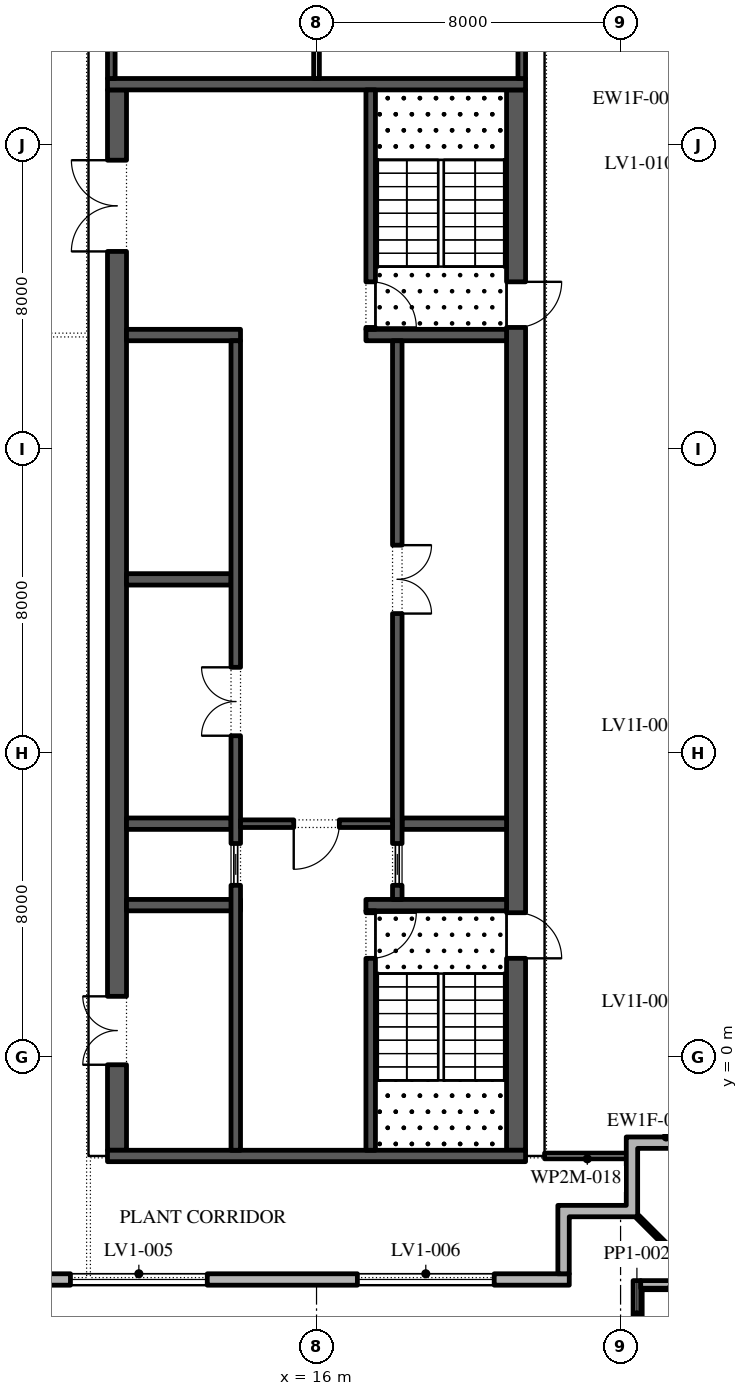
"""IFC4 building model, lengths in metres.
Left out: names, types, materials, properties, quantities, classifications, styles, units other than length and angle.
Written with IfcOpenShell. Run it as: python <this file> out.ifc"""

import sys

from ifc_helpers import new_model, si_unit, direction, frame, frame_2d, origin, place, context, subcontext, project, spatial, polyline, rectangle, outline, extrude, element, fill, save


model = new_model("IFC4")
c1 = context("Model", 3, precision=1e-05, world=origin(), true_north=direction((0.0, 1.0)))
c2 = subcontext(c1, "Body", "Model", "MODEL_VIEW")
j1 = project(units=[si_unit("LENGTHUNIT", "METRE"), si_unit("PLANEANGLEUNIT", "RADIAN")], contexts=[c1])
p1 = place(None, origin())
s1 = spatial("IfcSite", under=j1, at=p1, CompositionType="ELEMENT")
p2 = place(p1, origin())
s2 = spatial("IfcBuilding", under=s1, at=p2, CompositionType="ELEMENT")
p3 = place(p2, frame((0.0, 0.0, 363.6)))
s3 = spatial("IfcBuildingStorey", under=s2, at=p3, CompositionType="ELEMENT", Elevation=363.6)
p4 = place(p3, frame((-22.35, -5.85, 0.0), z_axis=(0.0, 0.0, 1.0), x_axis=(1.0, 0.0, 0.0)))
e1 = element("IfcWall", 1, at=p4, inside=s3, PredefinedType="STANDARD", context=c2, shape_type="SweptSolid", body=[
    extrude(rectangle(XDim=45.0, YDim=0.3, at=frame_2d((22.5, 0.0))), origin(), (0.0, 0.0, 1.0), 5.2),
])
p5 = place(p4, frame((1.825, 0.0, 0.6)))
e2 = element("IfcOpeningElement", 2, at=p5, cuts=e1, PredefinedType="OPENING", context=c2, shape_type="SweptSolid", body=[
    extrude(rectangle(XDim=3.6, YDim=4.15, at=frame_2d((1.8, 2.075))), frame((0.0, 0.16, 0.0), z_axis=(0.0, -1.0, 0.0), x_axis=(1.0, 0.0, 0.0)), (0.0, 0.0, 1.0), 0.32),
])
p6 = place(p4, frame((9.225, 0.0, 0.6)))
e3 = element("IfcOpeningElement", 3, at=p6, cuts=e1, PredefinedType="OPENING", context=c2, shape_type="SweptSolid", body=[
    extrude(rectangle(XDim=3.6, YDim=4.15, at=frame_2d((1.8, 2.075))), frame((0.0, 0.16, 0.0), z_axis=(0.0, -1.0, 0.0), x_axis=(1.0, 0.0, 0.0)), (0.0, 0.0, 1.0), 0.32),
])
p7 = place(p4, frame((16.775, 0.0, 0.6)))
e4 = element("IfcOpeningElement", 4, at=p7, cuts=e1, PredefinedType="OPENING", context=c2, shape_type="SweptSolid", body=[
    extrude(rectangle(XDim=3.6, YDim=4.15, at=frame_2d((1.8, 2.075))), frame((0.0, 0.16, 0.0), z_axis=(0.0, -1.0, 0.0), x_axis=(1.0, 0.0, 0.0)), (0.0, 0.0, 1.0), 0.32),
])
p8 = place(p4, frame((24.325, 0.0, 0.6)))
e5 = element("IfcOpeningElement", 5, at=p8, cuts=e1, PredefinedType="OPENING", context=c2, shape_type="SweptSolid", body=[
    extrude(rectangle(XDim=3.6, YDim=4.15, at=frame_2d((1.8, 2.075))), frame((0.0, 0.16, 0.0), z_axis=(0.0, -1.0, 0.0), x_axis=(1.0, 0.0, 0.0)), (0.0, 0.0, 1.0), 0.32),
])
p9 = place(p4, frame((31.875, 0.0, 0.6)))
e6 = element("IfcOpeningElement", 6, at=p9, cuts=e1, PredefinedType="OPENING", context=c2, shape_type="SweptSolid", body=[
    extrude(rectangle(XDim=3.6, YDim=4.15, at=frame_2d((1.8, 2.075))), frame((0.0, 0.16, 0.0), z_axis=(0.0, -1.0, 0.0), x_axis=(1.0, 0.0, 0.0)), (0.0, 0.0, 1.0), 0.32),
])
p10 = place(p4, frame((39.425, 0.0, 0.6)))
e7 = element("IfcOpeningElement", 7, at=p10, cuts=e1, PredefinedType="OPENING", context=c2, shape_type="SweptSolid", body=[
    extrude(rectangle(XDim=3.6, YDim=4.15, at=frame_2d((1.8, 2.075))), frame((0.0, 0.16, 0.0), z_axis=(0.0, -1.0, 0.0), x_axis=(1.0, 0.0, 0.0)), (0.0, 0.0, 1.0), 0.32),
])
p11 = place(p3, origin())
e8 = element("IfcWall", 8, at=p11, inside=s3, PredefinedType="STANDARD", context=c2, shape_type="SweptSolid", body=[
    extrude(outline(polyline([(24.15, -3.9), (24.15, -2.1), (26.25, -2.1), (26.25, -2.4), (24.45, -2.4), (24.45, -4.2), (22.65, -4.2), (22.65, -5.7), (22.35, -5.7), (22.35, -3.9), (24.15, -3.9)])), origin(), (0.0, 0.0, 1.0), 5.2),
])
p12 = place(p3, frame((24.43, -7.68, -0.05), z_axis=(0.0, 0.0, 1.0), x_axis=(0.0, 1.0, 0.0)))
e9 = element("IfcWall", 9, at=p12, inside=s3, PredefinedType="STANDARD", context=c2, shape_type="SweptSolid", body=[
    extrude(rectangle(XDim=1.8, YDim=0.2, at=frame_2d((0.9, 0.0))), origin(), (0.0, 0.0, 1.0), 1.1),
])
p13 = place(p3, frame((24.53, -5.98, -0.05), z_axis=(0.0, 0.0, 1.0), x_axis=(1.0, 0.0, 0.0)))
e10 = element("IfcWall", 10, at=p13, inside=s3, PredefinedType="STANDARD", context=c2, shape_type="SweptSolid", body=[
    extrude(rectangle(XDim=1.608, YDim=0.2, at=frame_2d((0.804, 0.0))), origin(), (0.0, 0.0, 1.0), 1.1),
])
p14 = place(p3, frame((24.45, -4.2, -0.05), z_axis=(0.0, 0.0, 1.0), x_axis=(0.707106781187, -0.707106781187, 0.0)))
e11 = element("IfcWall", 11, at=p14, inside=s3, PredefinedType="STANDARD", context=c2, shape_type="SweptSolid", body=[
    extrude(rectangle(XDim=2.667, YDim=0.1, at=frame_2d((1.333, 0.0))), origin(), (0.0, 0.0, 1.0), 5.25),
])
p15 = place(p3, frame((21.25, -2.45, 0.0), z_axis=(0.0, 0.0, 1.0), x_axis=(0.0, 1.0, 0.0)))
e12 = element("IfcWall", 12, at=p15, inside=s3, PredefinedType="SHEAR", context=c2, shape_type="SweptSolid", body=[
    extrude(rectangle(XDim=27.9, YDim=0.5, at=frame_2d((13.95, 0.0))), origin(), (0.0, 0.0, 1.0), 5.2),
])
p16 = place(p15, frame((5.05, 0.0, 0.0)))
e13 = element("IfcOpeningElement", 13, at=p16, cuts=e12, PredefinedType="OPENING", context=c2, shape_type="SweptSolid", body=[
    extrude(rectangle(XDim=1.2, YDim=2.1, at=frame_2d((0.6, 1.05))), frame((0.0, 0.26, 0.0), z_axis=(0.0, -1.0, 0.0), x_axis=(1.0, 0.0, 0.0)), (0.0, 0.0, 1.0), 0.52),
])
p17 = place(p15, frame((21.65, 0.0, 0.0)))
e14 = element("IfcOpeningElement", 14, at=p17, cuts=e12, PredefinedType="OPENING", context=c2, shape_type="SweptSolid", body=[
    extrude(rectangle(XDim=1.2, YDim=2.1, at=frame_2d((0.6, 1.05))), frame((0.0, 0.26, 0.0), z_axis=(0.0, -1.0, 0.0), x_axis=(1.0, 0.0, 0.0)), (0.0, 0.0, 1.0), 0.52),
])
p18 = place(p3, frame((10.75, -2.45, 0.0), z_axis=(0.0, 0.0, 1.0), x_axis=(0.0, 1.0, 0.0)))
e15 = element("IfcWall", 15, at=p18, inside=s3, PredefinedType="SHEAR", context=c2, shape_type="SweptSolid", body=[
    extrude(rectangle(XDim=27.9, YDim=0.5, at=frame_2d((13.95, 0.0))), origin(), (0.0, 0.0, 1.0), 5.2),
])
p19 = place(p18, frame((23.65, 0.0, 0.0)))
e16 = element("IfcOpeningElement", 16, at=p19, cuts=e15, PredefinedType="OPENING", context=c2, shape_type="SweptSolid", body=[
    extrude(rectangle(XDim=2.4, YDim=2.1, at=frame_2d((1.2, 1.05))), frame((0.0, 0.26, 0.0), z_axis=(0.0, -1.0, 0.0), x_axis=(1.0, 0.0, 0.0)), (0.0, 0.0, 1.0), 0.52),
])
p20 = place(p18, frame((2.25, 0.0, 0.0)))
e17 = element("IfcOpeningElement", 17, at=p20, cuts=e15, PredefinedType="OPENING", context=c2, shape_type="SweptSolid", body=[
    extrude(rectangle(XDim=1.8, YDim=2.4, at=frame_2d((0.9, 1.2))), frame((0.0, 0.26, 0.0), z_axis=(0.0, -1.0, 0.0), x_axis=(1.0, 0.0, 0.0)), (0.0, 0.0, 1.0), 0.52),
])
for number, where, z_axis, x_axis in (
    (18, (10.5, -2.6, 0.0), (0.0, 0.0, 1.0), (1.0, 0.0, 0.0)),
    (19, (10.5, 25.6, 0.0), (0.0, 0.0, 1.0), (1.0, 0.0, 0.0)),
):
    element("IfcWall", number, at=place(p3, frame(where, z_axis=z_axis, x_axis=x_axis)), inside=s3, PredefinedType="SHEAR", context=c2, shape_type="SweptSolid", body=[
        extrude(rectangle(XDim=11.0, YDim=0.3, at=frame_2d((5.5, 0.0))), origin(), (0.0, 0.0, 1.0), 5.2),
    ])
p21 = place(p3, frame((17.3, 4.0, 0.0), z_axis=(0.0, 0.0, 1.0), x_axis=(1.0, 0.0, 0.0)))
e20 = element("IfcWall", 20, at=p21, inside=s3, PredefinedType="SHEAR", context=c2, shape_type="SweptSolid", body=[
    extrude(rectangle(XDim=3.7, YDim=0.3, at=frame_2d((1.85, 0.0))), origin(), (0.0, 0.0, 1.0), 5.2),
])
p22 = place(p3, frame((17.425, -2.45, 0.0), z_axis=(0.0, 0.0, 1.0), x_axis=(0.0, 1.0, 0.0)))
e21 = element("IfcWall", 21, at=p22, inside=s3, PredefinedType="SHEAR", context=c2, shape_type="SweptSolid", body=[
    extrude(rectangle(XDim=6.3, YDim=0.25, at=frame_2d((3.15, 0.0))), origin(), (0.0, 0.0, 1.0), 5.2),
])
p23 = place(p22, frame((5.05, 0.0, 0.0)))
e22 = element("IfcOpeningElement", 22, at=p23, cuts=e21, PredefinedType="OPENING", context=c2, shape_type="SweptSolid", body=[
    extrude(rectangle(XDim=1.2, YDim=2.1, at=frame_2d((0.6, 1.05))), frame((0.0, 0.135, 0.0), z_axis=(0.0, -1.0, 0.0), x_axis=(1.0, 0.0, 0.0)), (0.0, 0.0, 1.0), 0.27),
])
p24 = place(p3, frame((17.3, 19.0, 0.0), z_axis=(0.0, 0.0, 1.0), x_axis=(1.0, 0.0, 0.0)))
e23 = element("IfcWall", 23, at=p24, inside=s3, PredefinedType="SHEAR", context=c2, shape_type="SweptSolid", body=[
    extrude(rectangle(XDim=3.7, YDim=0.3, at=frame_2d((1.85, 0.0))), origin(), (0.0, 0.0, 1.0), 5.2),
])
p25 = place(p3, frame((17.425, 19.15, 0.0), z_axis=(0.0, 0.0, 1.0), x_axis=(0.0, 1.0, 0.0)))
e24 = element("IfcWall", 24, at=p25, inside=s3, PredefinedType="SHEAR", context=c2, shape_type="SweptSolid", body=[
    extrude(rectangle(XDim=6.3, YDim=0.25, at=frame_2d((3.15, 0.0))), origin(), (0.0, 0.0, 1.0), 5.2),
])
p26 = place(p25, frame((0.05, 0.0, 0.0)))
e25 = element("IfcOpeningElement", 25, at=p26, cuts=e24, PredefinedType="OPENING", context=c2, shape_type="SweptSolid", body=[
    extrude(rectangle(XDim=1.2, YDim=2.1, at=frame_2d((0.6, 1.05))), frame((0.0, 0.135, 0.0), z_axis=(0.0, -1.0, 0.0), x_axis=(1.0, 0.0, 0.0)), (0.0, 0.0, 1.0), 0.27),
])
p27 = place(p3, frame((18.25, 6.143, 0.0), z_axis=(0.0, 0.0, 1.0), x_axis=(1.0, 0.0, 0.0)))
e26 = element("IfcWall", 26, at=p27, inside=s3, PredefinedType="SHEAR", context=c2, shape_type="SweptSolid", body=[
    extrude(rectangle(XDim=2.75, YDim=0.3, at=frame_2d((1.375, 0.0))), origin(), (0.0, 0.0, 1.0), 5.2),
])
p28 = place(p3, frame((18.125, 4.15, 0.0), z_axis=(0.0, 0.0, 1.0), x_axis=(0.0, 1.0, 0.0)))
e27 = element("IfcWall", 27, at=p28, inside=s3, PredefinedType="SHEAR", context=c2, shape_type="SweptSolid", body=[
    extrude(rectangle(XDim=14.7, YDim=0.25, at=frame_2d((7.35, 0.0))), origin(), (0.0, 0.0, 1.0), 5.2),
])
p29 = place(p28, frame((7.521, 0.0, 0.0)))
e28 = element("IfcOpeningElement", 28, at=p29, cuts=e27, PredefinedType="OPENING", context=c2, shape_type="SweptSolid", body=[
    extrude(rectangle(XDim=1.8, YDim=2.4, at=frame_2d((0.9, 1.2))), frame((0.0, 0.135, 0.0), z_axis=(0.0, -1.0, 0.0), x_axis=(1.0, 0.0, 0.0)), (0.0, 0.0, 1.0), 0.27),
])
p30 = place(p28, frame((0.371, 0.0, 0.0)))
e29 = element("IfcOpeningElement", 29, at=p30, cuts=e27, PredefinedType="OPENING", context=c2, shape_type="SweptSolid", body=[
    extrude(rectangle(XDim=1.1, YDim=2.1, at=frame_2d((0.55, 1.05))), frame((0.0, 0.135, 0.0), z_axis=(0.0, -1.0, 0.0), x_axis=(1.0, 0.0, 0.0)), (0.0, 0.0, 1.0), 0.27),
])
p31 = place(p3, frame((11.0, 4.0, 0.0), z_axis=(0.0, 0.0, 1.0), x_axis=(1.0, 0.0, 0.0)))
e30 = element("IfcWall", 30, at=p31, inside=s3, PredefinedType="SHEAR", context=c2, shape_type="SweptSolid", body=[
    extrude(rectangle(XDim=3.0, YDim=0.3, at=frame_2d((1.5, 0.0))), origin(), (0.0, 0.0, 1.0), 5.2),
])
for number, where, z_axis, x_axis in (
    (31, (11.0, 6.143, 0.0), (0.0, 0.0, 1.0), (1.0, 0.0, 0.0)),
    (32, (11.0, 12.571, 0.0), (0.0, 0.0, 1.0), (1.0, 0.0, 0.0)),
):
    element("IfcWall", number, at=place(p3, frame(where, z_axis=z_axis, x_axis=x_axis)), inside=s3, PredefinedType="SHEAR", context=c2, shape_type="SweptSolid", body=[
        extrude(rectangle(XDim=2.75, YDim=0.3, at=frame_2d((1.375, 0.0))), origin(), (0.0, 0.0, 1.0), 5.2),
    ])
p32 = place(p3, frame((11.0, 19.0, 0.0), z_axis=(0.0, 0.0, 1.0), x_axis=(1.0, 0.0, 0.0)))
e33 = element("IfcWall", 33, at=p32, inside=s3, PredefinedType="SHEAR", context=c2, shape_type="SweptSolid", body=[
    extrude(rectangle(XDim=3.0, YDim=0.3, at=frame_2d((1.5, 0.0))), origin(), (0.0, 0.0, 1.0), 5.2),
])
p33 = place(p3, frame((13.875, -2.45, 0.0), z_axis=(0.0, 0.0, 1.0), x_axis=(0.0, 1.0, 0.0)))
e34 = element("IfcWall", 34, at=p33, inside=s3, PredefinedType="SHEAR", context=c2, shape_type="SweptSolid", body=[
    extrude(rectangle(XDim=21.3, YDim=0.25, at=frame_2d((10.65, 0.0))), origin(), (0.0, 0.0, 1.0), 5.2),
])
p34 = place(p33, frame((10.907, 0.0, 0.0)))
e35 = element("IfcOpeningElement", 35, at=p34, cuts=e34, PredefinedType="OPENING", context=c2, shape_type="SweptSolid", body=[
    extrude(rectangle(XDim=1.8, YDim=2.4, at=frame_2d((0.9, 1.2))), frame((0.0, 0.135, 0.0), z_axis=(0.0, -1.0, 0.0), x_axis=(1.0, 0.0, 0.0)), (0.0, 0.0, 1.0), 0.27),
])
p35 = place(p33, frame((6.971, 0.0, 0.0)))
e36 = element("IfcOpeningElement", 36, at=p35, cuts=e34, PredefinedType="OPENING", context=c2, shape_type="SweptSolid", body=[
    extrude(rectangle(XDim=1.1, YDim=2.1, at=frame_2d((0.55, 1.05))), frame((0.0, 0.135, 0.0), z_axis=(0.0, -1.0, 0.0), x_axis=(1.0, 0.0, 0.0)), (0.0, 0.0, 1.0), 0.27),
])
p36 = place(p3, frame((14.0, 6.143, 0.0), z_axis=(0.0, 0.0, 1.0), x_axis=(1.0, 0.0, 0.0)))
e37 = element("IfcWall", 37, at=p36, inside=s3, PredefinedType="SHEAR", context=c2, shape_type="SweptSolid", body=[
    extrude(rectangle(XDim=4.0, YDim=0.2, at=frame_2d((2.0, 0.0))), origin(), (0.0, 0.0, 1.0), 5.2),
])
p37 = place(p36, frame((1.4, 0.0, 0.0)))
e38 = element("IfcOpeningElement", 38, at=p37, cuts=e37, PredefinedType="OPENING", context=c2, shape_type="SweptSolid", body=[
    extrude(rectangle(XDim=1.2, YDim=2.1, at=frame_2d((0.6, 1.05))), frame((0.0, 0.11, 0.0), z_axis=(0.0, -1.0, 0.0), x_axis=(1.0, 0.0, 0.0)), (0.0, 0.0, 1.0), 0.22),
])
p38 = place(p3, frame((21.4, 25.75, 0.0), z_axis=(0.0, 0.0, 1.0), x_axis=(0.0, 1.0, 0.0)))
e39 = element("IfcWall", 39, at=p38, inside=s3, PredefinedType="SHEAR", context=c2, shape_type="SweptSolid", body=[
    extrude(rectangle(XDim=15.05, YDim=0.2, at=frame_2d((7.525, 0.0))), origin(), (0.0, 0.0, 1.0), 5.2),
])
p39 = place(p38, frame((6.625, 0.0, 0.0)))
e40 = element("IfcOpeningElement", 40, at=p39, cuts=e39, PredefinedType="OPENING", context=c2, shape_type="SweptSolid", body=[
    extrude(rectangle(XDim=1.8, YDim=2.4, at=frame_2d((0.9, 1.2))), frame((0.0, 0.11, 0.0), z_axis=(0.0, -1.0, 0.0), x_axis=(1.0, 0.0, 0.0)), (0.0, 0.0, 1.0), 0.22),
])
p40 = place(p3, frame((10.6, 25.75, 0.0), z_axis=(0.0, 0.0, 1.0), x_axis=(0.0, 1.0, 0.0)))
e41 = element("IfcWall", 41, at=p40, inside=s3, PredefinedType="SHEAR", context=c2, shape_type="SweptSolid", body=[
    extrude(rectangle(XDim=15.05, YDim=0.2, at=frame_2d((7.525, 0.0))), origin(), (0.0, 0.0, 1.0), 5.2),
])
p41 = place(p40, frame((2.837, 0.0, 0.0)))
e42 = element("IfcOpeningElement", 42, at=p41, cuts=e41, PredefinedType="OPENING", context=c2, shape_type="SweptSolid", body=[
    extrude(rectangle(XDim=1.8, YDim=2.4, at=frame_2d((0.9, 1.2))), frame((0.0, 0.11, 0.0), z_axis=(0.0, -1.0, 0.0), x_axis=(1.0, 0.0, 0.0)), (0.0, 0.0, 1.0), 0.22),
])
p42 = place(p40, frame((10.438, 0.0, 0.0)))
e43 = element("IfcOpeningElement", 43, at=p42, cuts=e41, PredefinedType="OPENING", context=c2, shape_type="SweptSolid", body=[
    extrude(rectangle(XDim=1.8, YDim=2.4, at=frame_2d((0.9, 1.2))), frame((0.0, 0.11, 0.0), z_axis=(0.0, -1.0, 0.0), x_axis=(1.0, 0.0, 0.0)), (0.0, 0.0, 1.0), 0.22),
])
p43 = place(p3, frame((16.0, 25.75, 0.0), z_axis=(0.0, 0.0, 1.0), x_axis=(0.0, 1.0, 0.0)))
e44 = element("IfcWall", 44, at=p43, inside=s3, PredefinedType="PARTITIONING", context=c2, shape_type="SweptSolid", body=[
    extrude(rectangle(XDim=15.05, YDim=0.15, at=frame_2d((7.525, 0.0))), origin(), (0.0, 0.0, 1.0), 5.2),
])
p44 = place(p3, frame((22.0, -2.6, 0.0), z_axis=(0.0, 0.0, 1.0), x_axis=(1.0, 0.0, 0.0)))
e45 = element("IfcWall", 45, at=p44, inside=s3, PredefinedType="PARTITIONING", context=c2, shape_type="SweptSolid", body=[
    extrude(rectangle(XDim=2.25, YDim=0.15, at=frame_2d((1.125, 0.0))), origin(), (0.0, 0.0, 1.0), 5.2),
])
p45 = place(p9, origin())
e46 = element("IfcWindow", 46, at=p45, inside=s3, PartitioningType="DOUBLE_PANEL_HORIZONTAL", PredefinedType="WINDOW", context=c2, shape_type="SweptSolid", body=[
    extrude(rectangle(XDim=3.6, YDim=4.15, at=frame_2d((1.8, 2.075))), frame((0.0, 0.03, 0.0), z_axis=(0.0, -1.0, 0.0), x_axis=(1.0, 0.0, 0.0)), (0.0, 0.0, 1.0), 0.06),
])
fill(e6, e46)
p46 = place(p10, origin())
e47 = element("IfcWindow", 47, at=p46, inside=s3, PartitioningType="DOUBLE_PANEL_HORIZONTAL", PredefinedType="WINDOW", context=c2, shape_type="SweptSolid", body=[
    extrude(rectangle(XDim=3.6, YDim=4.15, at=frame_2d((1.8, 2.075))), frame((0.0, 0.03, 0.0), z_axis=(0.0, -1.0, 0.0), x_axis=(1.0, 0.0, 0.0)), (0.0, 0.0, 1.0), 0.06),
])
fill(e7, e47)
p47 = place(p29, frame((1.8, -0.2, 0.0), z_axis=(0.0, 0.0, 1.0), x_axis=(-1.0, 0.0, 0.0)))
e48 = element("IfcDoor", 48, at=p47, inside=s3, OperationType="DOUBLE_DOOR_SINGLE_SWING", PredefinedType="DOOR", context=c2, shape_type="SweptSolid", body=[
    extrude(rectangle(XDim=1.8, YDim=2.4, at=frame_2d((0.9, 1.2))), frame((0.0, -0.075, 0.0), z_axis=(0.0, -1.0, 0.0), x_axis=(1.0, 0.0, 0.0)), (0.0, 0.0, 1.0), 0.05),
])
fill(e28, e48)
p48 = place(p30, origin())
e49 = element("IfcDoor", 49, at=p48, inside=s3, OperationType="SLIDING_TO_LEFT", PredefinedType="DOOR", context=c2, shape_type="SweptSolid", body=[
    extrude(rectangle(XDim=1.1, YDim=2.1, at=frame_2d((0.55, 1.05))), frame((0.0, 0.025, 0.0), z_axis=(0.0, -1.0, 0.0), x_axis=(1.0, 0.0, 0.0)), (0.0, 0.0, 1.0), 0.05),
])
fill(e29, e49)
p49 = place(p34, origin())
e50 = element("IfcDoor", 50, at=p49, inside=s3, OperationType="DOUBLE_DOOR_SINGLE_SWING", PredefinedType="DOOR", context=c2, shape_type="SweptSolid", body=[
    extrude(rectangle(XDim=1.8, YDim=2.4, at=frame_2d((0.9, 1.2))), frame((0.0, 0.125, 0.0), z_axis=(0.0, -1.0, 0.0), x_axis=(1.0, 0.0, 0.0)), (0.0, 0.0, 1.0), 0.05),
])
fill(e35, e50)
p50 = place(p35, origin())
e51 = element("IfcDoor", 51, at=p50, inside=s3, OperationType="SLIDING_TO_LEFT", PredefinedType="DOOR", context=c2, shape_type="SweptSolid", body=[
    extrude(rectangle(XDim=1.1, YDim=2.1, at=frame_2d((0.55, 1.05))), frame((0.0, 0.025, 0.0), z_axis=(0.0, -1.0, 0.0), x_axis=(1.0, 0.0, 0.0)), (0.0, 0.0, 1.0), 0.05),
])
fill(e36, e51)
p51 = place(p37, frame((1.2, 0.0, 0.0), z_axis=(0.0, 0.0, 1.0), x_axis=(-1.0, 0.0, 0.0)))
e52 = element("IfcDoor", 52, at=p51, inside=s3, OperationType="SINGLE_SWING_LEFT", PredefinedType="DOOR", context=c2, shape_type="SweptSolid", body=[
    extrude(rectangle(XDim=1.2, YDim=2.1, at=frame_2d((0.6, 1.05))), frame((0.0, 0.025, 0.0), z_axis=(0.0, -1.0, 0.0), x_axis=(1.0, 0.0, 0.0)), (0.0, 0.0, 1.0), 0.05),
])
fill(e38, e52)
p52 = place(p19, origin())
e53 = element("IfcDoor", 53, at=p52, inside=s3, OperationType="DOUBLE_DOOR_SINGLE_SWING", PredefinedType="DOOR", context=c2, shape_type="SweptSolid", body=[
    extrude(rectangle(XDim=2.4, YDim=2.1, at=frame_2d((1.2, 1.05))), frame((0.0, 0.025, 0.0), z_axis=(0.0, -1.0, 0.0), x_axis=(1.0, 0.0, 0.0)), (0.0, 0.0, 1.0), 0.05),
])
fill(e16, e53)
p53 = place(p23, frame((1.2, 0.0, 0.0), z_axis=(0.0, 0.0, 1.0), x_axis=(-1.0, 0.0, 0.0)))
e54 = element("IfcDoor", 54, at=p53, inside=s3, OperationType="SINGLE_SWING_RIGHT", PredefinedType="DOOR", context=c2, shape_type="SweptSolid", body=[
    extrude(rectangle(XDim=1.2, YDim=2.1, at=frame_2d((0.6, 1.05))), frame((0.0, 0.025, 0.0), z_axis=(0.0, -1.0, 0.0), x_axis=(1.0, 0.0, 0.0)), (0.0, 0.0, 1.0), 0.05),
])
fill(e22, e54)
p54 = place(p16, frame((1.2, 0.0, 0.0), z_axis=(0.0, 0.0, 1.0), x_axis=(-1.0, 0.0, 0.0)))
e55 = element("IfcDoor", 55, at=p54, inside=s3, OperationType="SINGLE_SWING_LEFT", PredefinedType="DOOR", context=c2, shape_type="SweptSolid", body=[
    extrude(rectangle(XDim=1.2, YDim=2.1, at=frame_2d((0.6, 1.05))), frame((0.0, 0.025, 0.0), z_axis=(0.0, -1.0, 0.0), x_axis=(1.0, 0.0, 0.0)), (0.0, 0.0, 1.0), 0.05),
])
fill(e13, e55)
p55 = place(p26, frame((1.2, 0.0, 0.0), z_axis=(0.0, 0.0, 1.0), x_axis=(-1.0, 0.0, 0.0)))
e56 = element("IfcDoor", 56, at=p55, inside=s3, OperationType="SINGLE_SWING_LEFT", PredefinedType="DOOR", context=c2, shape_type="SweptSolid", body=[
    extrude(rectangle(XDim=1.2, YDim=2.1, at=frame_2d((0.6, 1.05))), frame((0.0, 0.025, 0.0), z_axis=(0.0, -1.0, 0.0), x_axis=(1.0, 0.0, 0.0)), (0.0, 0.0, 1.0), 0.05),
])
fill(e25, e56)
p56 = place(p17, frame((1.2, 0.0, 0.0), z_axis=(0.0, 0.0, 1.0), x_axis=(-1.0, 0.0, 0.0)))
e57 = element("IfcDoor", 57, at=p56, inside=s3, OperationType="SINGLE_SWING_RIGHT", PredefinedType="DOOR", context=c2, shape_type="SweptSolid", body=[
    extrude(rectangle(XDim=1.2, YDim=2.1, at=frame_2d((0.6, 1.05))), frame((0.0, 0.025, 0.0), z_axis=(0.0, -1.0, 0.0), x_axis=(1.0, 0.0, 0.0)), (0.0, 0.0, 1.0), 0.05),
])
fill(e14, e57)
p57 = place(p20, origin())
e58 = element("IfcDoor", 58, at=p57, inside=s3, OperationType="DOUBLE_DOOR_SINGLE_SWING", PredefinedType="DOOR", context=c2, shape_type="SweptSolid", body=[
    extrude(rectangle(XDim=1.8, YDim=2.4, at=frame_2d((0.9, 1.2))), frame((0.0, -0.2, 0.0), z_axis=(0.0, -1.0, 0.0), x_axis=(1.0, 0.0, 0.0)), (0.0, 0.0, 1.0), 0.05),
])
fill(e17, e58)
save(model, sys.argv[1])
